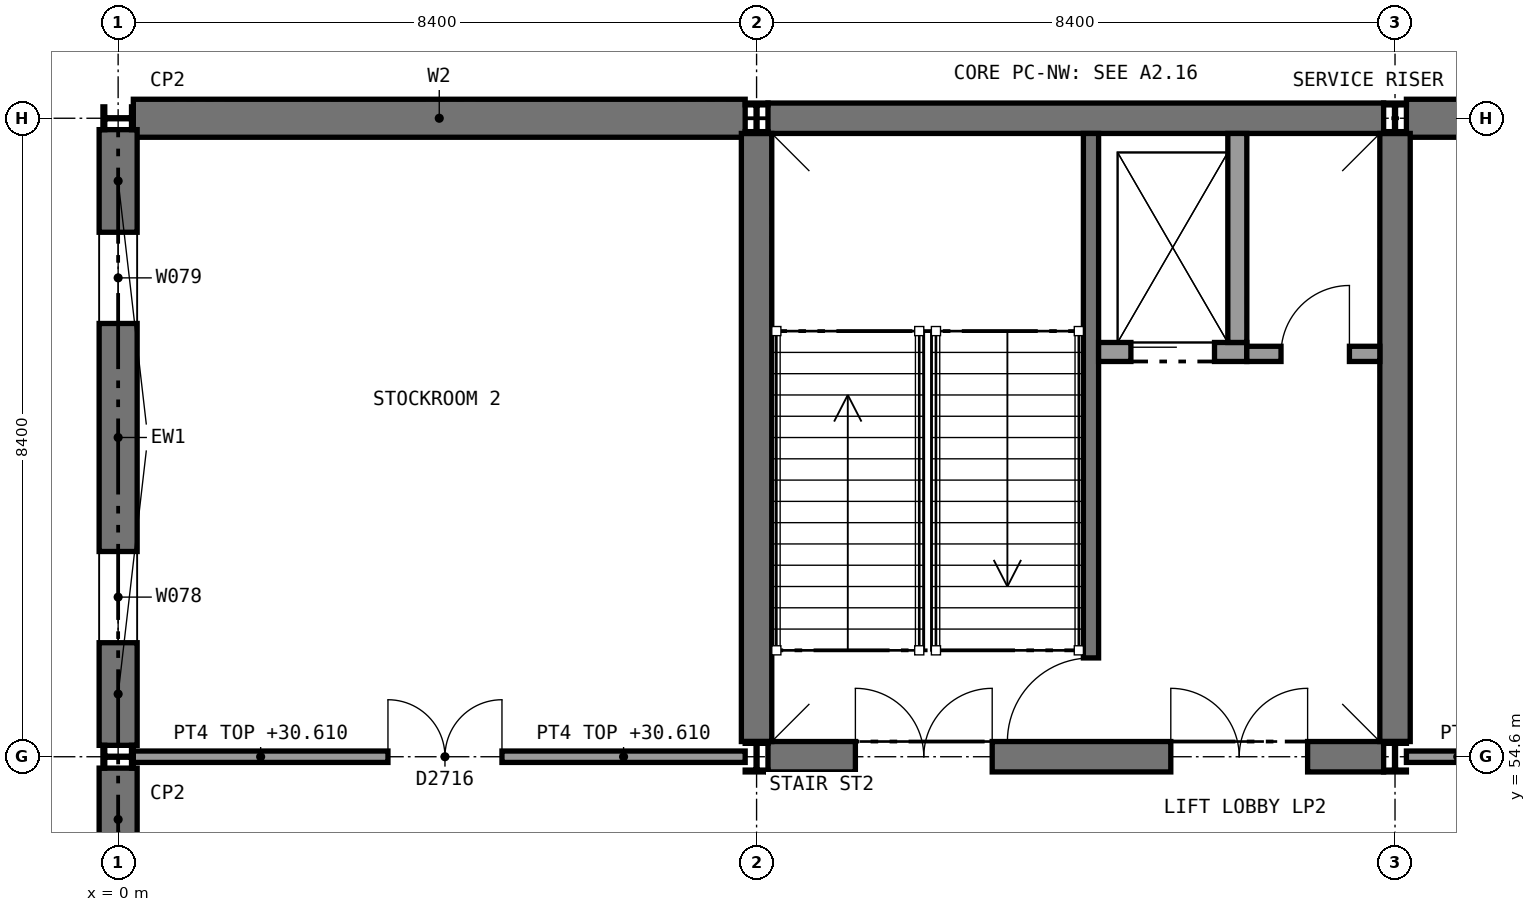
"""IFC4 building model, lengths in metres.
Left out: names, types, materials, properties, quantities, classifications, styles, units other than length and angle.
Written with IfcOpenShell. Run it as: python <this file> out.ifc"""

import sys

from ifc_helpers import new_model, si_unit, direction, frame, frame_2d, origin, origin_2d, place, context, subcontext, project, spatial, rectangle, i_section, extrude, element, fill, save


model = new_model("IFC4")
c1 = context("Model", 3, precision=1e-05, world=origin(), true_north=direction((0.0, 1.0)))
c2 = subcontext(c1, "Body", "Model", "MODEL_VIEW")
j1 = project(units=[si_unit("LENGTHUNIT", "METRE"), si_unit("PLANEANGLEUNIT", "RADIAN")], contexts=[c1])
p1 = place(None, origin())
s1 = spatial("IfcSite", under=j1, at=p1, CompositionType="ELEMENT")
p2 = place(p1, origin())
s2 = spatial("IfcBuilding", under=s1, at=p2, CompositionType="ELEMENT")
p3 = place(p2, frame((0.0, 0.0, 25.8)))
s3 = spatial("IfcBuildingStorey", under=s2, at=p3, CompositionType="ELEMENT", Elevation=25.8)
p4 = place(p3, frame((0.2, 63.0, 0.0), z_axis=(0.0, 0.0, 1.0), x_axis=(1.0, 0.0, 0.0)))
e1 = element("IfcWall", 1, at=p4, inside=s3, PredefinedType="SHEAR", context=c2, shape_type="SweptSolid", body=[
    extrude(rectangle(XDim=8.05, YDim=0.5, at=frame_2d((4.025, 0.0))), origin(), (0.0, 0.0, 1.0), 5.2),
])
p5 = place(p3, frame((16.95, 63.0, 0.0), z_axis=(0.0, 0.0, 1.0), x_axis=(1.0, 0.0, 0.0)))
e2 = element("IfcWall", 2, at=p5, inside=s3, PredefinedType="SHEAR", context=c2, shape_type="SweptSolid", body=[
    extrude(rectangle(XDim=8.1, YDim=0.5, at=frame_2d((4.05, 0.0))), origin(), (0.0, 0.0, 1.0), 5.2),
])
p6 = place(p3, frame((8.55, 63.0, 0.0), z_axis=(0.0, 0.0, 1.0), x_axis=(1.0, 0.0, 0.0)))
e3 = element("IfcWall", 3, at=p6, inside=s3, PredefinedType="SHEAR", context=c2, shape_type="SweptSolid", body=[
    extrude(rectangle(XDim=8.1, YDim=0.4, at=frame_2d((4.05, 0.0))), origin(), (0.0, 0.0, 1.0), 4.51),
])
p7 = place(p3, frame((8.55, 54.6, 0.0), z_axis=(0.0, 0.0, 1.0), x_axis=(1.0, 0.0, 0.0)))
e4 = element("IfcWall", 4, at=p7, inside=s3, PredefinedType="SHEAR", context=c2, shape_type="SweptSolid", body=[
    extrude(rectangle(XDim=8.1, YDim=0.4, at=frame_2d((4.05, 0.0))), origin(), (0.0, 0.0, 1.0), 4.51),
])
p8 = place(p7, frame((1.15, 0.0, 0.0)))
e5 = element("IfcOpeningElement", 5, at=p8, cuts=e4, PredefinedType="OPENING", context=c2, shape_type="SweptSolid", body=[
    extrude(rectangle(XDim=1.8, YDim=2.1, at=frame_2d((0.9, 1.05))), frame((0.0, 0.21, 0.0), z_axis=(0.0, -1.0, 0.0), x_axis=(1.0, 0.0, 0.0)), (0.0, 0.0, 1.0), 0.42),
])
p9 = place(p7, frame((5.3, 0.0, 0.0)))
e6 = element("IfcOpeningElement", 6, at=p9, cuts=e4, PredefinedType="OPENING", context=c2, shape_type="SweptSolid", body=[
    extrude(rectangle(XDim=1.8, YDim=2.1, at=frame_2d((0.9, 1.05))), frame((0.0, 0.21, 0.0), z_axis=(0.0, -1.0, 0.0), x_axis=(1.0, 0.0, 0.0)), (0.0, 0.0, 1.0), 0.42),
])
for number, where, z_axis, x_axis in (
    (7, (8.4, 54.8, 0.0), (0.0, 0.0, 1.0), (0.0, 1.0, 0.0)),
    (8, (16.8, 54.8, 0.0), (0.0, 0.0, 1.0), (0.0, 1.0, 0.0)),
):
    element("IfcWall", number, at=place(p3, frame(where, z_axis=z_axis, x_axis=x_axis)), inside=s3, PredefinedType="SHEAR", context=c2, shape_type="SweptSolid", body=[
        extrude(rectangle(XDim=8.0, YDim=0.4, at=frame_2d((4.0, 0.0))), origin(), (0.0, 0.0, 1.0), 5.2),
    ])
for number, where, z_axis, x_axis in (
    (9, (0.0, 54.6, 0.0), (0.0, 0.0, 1.0), (0.0, 1.0, 0.0)),
    (10, (0.0, 63.0, 0.0), (0.0, 0.0, 1.0), (0.0, 1.0, 0.0)),
    (11, (8.4, 54.6, 0.0), (0.0, 0.0, 1.0), (1.0, 0.0, 0.0)),
    (12, (8.4, 63.0, 0.0), (0.0, 0.0, 1.0), (1.0, 0.0, 0.0)),
    (13, (16.8, 54.6, 0.0), (0.0, 0.0, 1.0), (1.0, 0.0, 0.0)),
    (14, (16.8, 63.0, 0.0), (0.0, 0.0, 1.0), (1.0, 0.0, 0.0)),
):
    element("IfcColumn", number, at=place(p3, frame(where, z_axis=z_axis, x_axis=x_axis)), inside=s3, PredefinedType="COLUMN", context=c2, shape_type="SweptSolid", body=[
        extrude(i_section(OverallWidth=0.3, OverallDepth=0.4, WebThickness=0.013, FlangeThickness=0.024, FilletRadius=0.027, at=origin_2d()), origin(), (0.0, 0.0, 1.0), 5.4),
    ])
p10 = place(p3, frame((0.2, 54.6, 0.0), z_axis=(0.0, 0.0, 1.0), x_axis=(1.0, 0.0, 0.0)))
e15 = element("IfcWall", 15, at=p10, inside=s3, PredefinedType="SOLIDWALL", context=c2, shape_type="SweptSolid", body=[
    extrude(rectangle(XDim=8.05, YDim=0.15, at=frame_2d((4.025, 0.0))), origin(), (0.0, 0.0, 1.0), 4.81),
])
p11 = place(p10, frame((3.35, 0.0, 0.0)))
e16 = element("IfcOpeningElement", 16, at=p11, cuts=e15, PredefinedType="OPENING", context=c2, shape_type="SweptSolid", body=[
    extrude(rectangle(XDim=1.5, YDim=2.1, at=frame_2d((0.75, 1.05))), frame((0.0, 0.085, 0.0), z_axis=(0.0, -1.0, 0.0), x_axis=(1.0, 0.0, 0.0)), (0.0, 0.0, 1.0), 0.17),
])
p12 = place(p3, frame((16.95, 54.6, 0.0), z_axis=(0.0, 0.0, 1.0), x_axis=(1.0, 0.0, 0.0)))
e17 = element("IfcWall", 17, at=p12, inside=s3, PredefinedType="SOLIDWALL", context=c2, shape_type="SweptSolid", body=[
    extrude(rectangle(XDim=4.05, YDim=0.15, at=frame_2d((2.025, 0.0))), origin(), (0.0, 0.0, 1.0), 4.89),
])
p13 = place(p12, frame((1.35, 0.0, 0.0)))
e18 = element("IfcOpeningElement", 18, at=p13, cuts=e17, PredefinedType="OPENING", context=c2, shape_type="SweptSolid", body=[
    extrude(rectangle(XDim=1.5, YDim=2.1, at=frame_2d((0.75, 1.05))), frame((0.0, 0.085, 0.0), z_axis=(0.0, -1.0, 0.0), x_axis=(1.0, 0.0, 0.0)), (0.0, 0.0, 1.0), 0.17),
])
p14 = place(p3, frame((0.0, 46.35, 0.0), z_axis=(0.0, 0.0, 1.0), x_axis=(0.0, 1.0, 0.0)))
e19 = element("IfcWall", 19, at=p14, inside=s3, PredefinedType="STANDARD", context=c2, shape_type="SweptSolid", body=[
    extrude(rectangle(XDim=8.1, YDim=0.5, at=frame_2d((4.05, 0.0))), origin(), (0.0, 0.0, 1.0), 5.2),
])
p15 = place(p14, frame((1.35, 0.0, 2.7)))
e20 = element("IfcOpeningElement", 20, at=p15, cuts=e19, PredefinedType="OPENING", context=c2, shape_type="SweptSolid", body=[
    extrude(rectangle(XDim=1.2, YDim=1.2, at=frame_2d((0.6, 0.6))), frame((0.0, 0.26, 0.0), z_axis=(0.0, -1.0, 0.0), x_axis=(1.0, 0.0, 0.0)), (0.0, 0.0, 1.0), 0.52),
])
p16 = place(p14, frame((5.55, 0.0, 2.7)))
e21 = element("IfcOpeningElement", 21, at=p16, cuts=e19, PredefinedType="OPENING", context=c2, shape_type="SweptSolid", body=[
    extrude(rectangle(XDim=1.2, YDim=1.2, at=frame_2d((0.6, 0.6))), frame((0.0, 0.26, 0.0), z_axis=(0.0, -1.0, 0.0), x_axis=(1.0, 0.0, 0.0)), (0.0, 0.0, 1.0), 0.52),
])
p17 = place(p3, frame((0.0, 54.75, 0.0), z_axis=(0.0, 0.0, 1.0), x_axis=(0.0, 1.0, 0.0)))
e22 = element("IfcWall", 22, at=p17, inside=s3, PredefinedType="STANDARD", context=c2, shape_type="SweptSolid", body=[
    extrude(rectangle(XDim=8.1, YDim=0.5, at=frame_2d((4.05, 0.0))), origin(), (0.0, 0.0, 1.0), 5.2),
])
p18 = place(p17, frame((1.35, 0.0, 2.7)))
e23 = element("IfcOpeningElement", 23, at=p18, cuts=e22, PredefinedType="OPENING", context=c2, shape_type="SweptSolid", body=[
    extrude(rectangle(XDim=1.2, YDim=1.2, at=frame_2d((0.6, 0.6))), frame((0.0, 0.26, 0.0), z_axis=(0.0, -1.0, 0.0), x_axis=(1.0, 0.0, 0.0)), (0.0, 0.0, 1.0), 0.52),
])
p19 = place(p17, frame((5.55, 0.0, 2.7)))
e24 = element("IfcOpeningElement", 24, at=p19, cuts=e22, PredefinedType="OPENING", context=c2, shape_type="SweptSolid", body=[
    extrude(rectangle(XDim=1.2, YDim=1.2, at=frame_2d((0.6, 0.6))), frame((0.0, 0.26, 0.0), z_axis=(0.0, -1.0, 0.0), x_axis=(1.0, 0.0, 0.0)), (0.0, 0.0, 1.0), 0.52),
])
p20 = place(p3, frame((12.8, 62.8, 0.0), z_axis=(0.0, 0.0, 1.0), x_axis=(0.0, -1.0, 0.0)))
e25 = element("IfcWall", 25, at=p20, inside=s3, PredefinedType="SHEAR", context=c2, shape_type="SweptSolid", body=[
    extrude(rectangle(XDim=8.0, YDim=0.2, at=frame_2d((4.0, 0.0))), origin(), (0.0, 0.0, 1.0), 5.2),
])
p21 = place(p20, frame((6.9, 0.0, 0.0)))
e26 = element("IfcOpeningElement", 26, at=p21, cuts=e25, PredefinedType="OPENING", context=c2, shape_type="SweptSolid", body=[
    extrude(rectangle(XDim=1.11, YDim=2.1, at=frame_2d((0.555, 1.05))), frame((0.0, 0.11, 0.0), z_axis=(0.0, -1.0, 0.0), x_axis=(1.0, 0.0, 0.0)), (0.0, 0.0, 1.0), 0.22),
])
p22 = place(p3, frame((12.9, 59.925, 0.0), z_axis=(0.0, 0.0, 1.0), x_axis=(1.0, 0.0, 0.0)))
e27 = element("IfcWall", 27, at=p22, inside=s3, PredefinedType="SOLIDWALL", context=c2, shape_type="SweptSolid", body=[
    extrude(rectangle(XDim=1.95, YDim=0.25, at=frame_2d((0.975, 0.0))), origin(), (0.0, 0.0, 1.0), 5.2),
])
p23 = place(p22, frame((0.425, 0.0, 0.0)))
e28 = element("IfcOpeningElement", 28, at=p23, cuts=e27, PredefinedType="OPENING", context=c2, shape_type="SweptSolid", body=[
    extrude(rectangle(XDim=1.1, YDim=2.1, at=frame_2d((0.55, 1.05))), frame((0.0, 0.135, 0.0), z_axis=(0.0, -1.0, 0.0), x_axis=(1.0, 0.0, 0.0)), (0.0, 0.0, 1.0), 0.27),
])
p24 = place(p3, frame((14.725, 62.8, 0.0), z_axis=(0.0, 0.0, 1.0), x_axis=(0.0, -1.0, 0.0)))
e29 = element("IfcWall", 29, at=p24, inside=s3, PredefinedType="SOLIDWALL", context=c2, shape_type="SweptSolid", body=[
    extrude(rectangle(XDim=2.75, YDim=0.25, at=frame_2d((1.375, 0.0))), origin(), (0.0, 0.0, 1.0), 5.2),
])
p25 = place(p3, frame((14.85, 59.9, 0.0), z_axis=(0.0, 0.0, 1.0), x_axis=(1.0, 0.0, 0.0)))
e30 = element("IfcWall", 30, at=p25, inside=s3, PredefinedType="PARTITIONING", context=c2, shape_type="SweptSolid", body=[
    extrude(rectangle(XDim=1.75, YDim=0.2, at=frame_2d((0.875, 0.0))), origin(), (0.0, 0.0, 1.0), 5.2),
])
p26 = place(p25, frame((0.45, 0.0, 0.0)))
e31 = element("IfcOpeningElement", 31, at=p26, cuts=e30, PredefinedType="OPENING", context=c2, shape_type="SweptSolid", body=[
    extrude(rectangle(XDim=0.9, YDim=2.1, at=frame_2d((0.45, 1.05))), frame((0.0, 0.11, 0.0), z_axis=(0.0, -1.0, 0.0), x_axis=(1.0, 0.0, 0.0)), (0.0, 0.0, 1.0), 0.22),
])
p27 = place(p11, origin())
e32 = element("IfcDoor", 32, at=p27, inside=s3, OperationType="DOUBLE_DOOR_SINGLE_SWING", PredefinedType="DOOR", context=c2, shape_type="SweptSolid", body=[
    extrude(rectangle(XDim=1.5, YDim=2.1, at=frame_2d((0.75, 1.05))), frame((0.0, 0.025, 0.0), z_axis=(0.0, -1.0, 0.0), x_axis=(1.0, 0.0, 0.0)), (0.0, 0.0, 1.0), 0.05),
])
fill(e16, e32)
p28 = place(p18, origin())
e33 = element("IfcWindow", 33, at=p28, inside=s3, PartitioningType="SINGLE_PANEL", PredefinedType="WINDOW", context=c2, shape_type="SweptSolid", body=[
    extrude(rectangle(XDim=1.2, YDim=1.2, at=frame_2d((0.6, 0.6))), frame((0.0, 0.03, 0.0), z_axis=(0.0, -1.0, 0.0), x_axis=(1.0, 0.0, 0.0)), (0.0, 0.0, 1.0), 0.06),
])
fill(e23, e33)
p29 = place(p19, origin())
e34 = element("IfcWindow", 34, at=p29, inside=s3, PartitioningType="SINGLE_PANEL", PredefinedType="WINDOW", context=c2, shape_type="SweptSolid", body=[
    extrude(rectangle(XDim=1.2, YDim=1.2, at=frame_2d((0.6, 0.6))), frame((0.0, 0.03, 0.0), z_axis=(0.0, -1.0, 0.0), x_axis=(1.0, 0.0, 0.0)), (0.0, 0.0, 1.0), 0.06),
])
fill(e24, e34)
p30 = place(p21, frame((1.1, 0.0, 0.0), z_axis=(0.0, 0.0, 1.0), x_axis=(-1.0, 0.0, 0.0)))
e35 = element("IfcDoor", 35, at=p30, inside=s3, OperationType="SINGLE_SWING_LEFT", PredefinedType="DOOR", context=c2, shape_type="SweptSolid", body=[
    extrude(rectangle(XDim=1.1, YDim=2.1, at=frame_2d((0.55, 1.05))), frame((0.0, 0.025, 0.0), z_axis=(0.0, -1.0, 0.0), x_axis=(1.0, 0.0, 0.0)), (0.0, 0.0, 1.0), 0.05),
])
fill(e26, e35)
p31 = place(p23, frame((1.1, 0.0, 0.0), z_axis=(0.0, 0.0, 1.0), x_axis=(-1.0, 0.0, 0.0)))
e36 = element("IfcDoor", 36, at=p31, inside=s3, OperationType="SLIDING_TO_RIGHT", PredefinedType="DOOR", context=c2, shape_type="SweptSolid", body=[
    extrude(rectangle(XDim=1.1, YDim=2.1, at=frame_2d((0.55, 1.05))), frame((0.0, 0.025, 0.0), z_axis=(0.0, -1.0, 0.0), x_axis=(1.0, 0.0, 0.0)), (0.0, 0.0, 1.0), 0.05),
])
fill(e28, e36)
p32 = place(p26, origin())
e37 = element("IfcDoor", 37, at=p32, inside=s3, OperationType="SINGLE_SWING_RIGHT", PredefinedType="DOOR", context=c2, shape_type="SweptSolid", body=[
    extrude(rectangle(XDim=0.9, YDim=2.1, at=frame_2d((0.45, 1.05))), frame((0.0, 0.025, 0.0), z_axis=(0.0, -1.0, 0.0), x_axis=(1.0, 0.0, 0.0)), (0.0, 0.0, 1.0), 0.05),
])
fill(e31, e37)
p33 = place(p8, origin())
e38 = element("IfcDoor", 38, at=p33, inside=s3, OperationType="DOUBLE_DOOR_SINGLE_SWING", PredefinedType="DOOR", context=c2, shape_type="SweptSolid", body=[
    extrude(rectangle(XDim=1.8, YDim=2.1, at=frame_2d((0.9, 1.05))), frame((0.0, 0.025, 0.0), z_axis=(0.0, -1.0, 0.0), x_axis=(1.0, 0.0, 0.0)), (0.0, 0.0, 1.0), 0.05),
])
fill(e5, e38)
p34 = place(p9, origin())
e39 = element("IfcDoor", 39, at=p34, inside=s3, OperationType="DOUBLE_DOOR_SINGLE_SWING", PredefinedType="DOOR", context=c2, shape_type="SweptSolid", body=[
    extrude(rectangle(XDim=1.8, YDim=2.1, at=frame_2d((0.9, 1.05))), frame((0.0, 0.025, 0.0), z_axis=(0.0, -1.0, 0.0), x_axis=(1.0, 0.0, 0.0)), (0.0, 0.0, 1.0), 0.05),
])
fill(e6, e39)
save(model, sys.argv[1])
